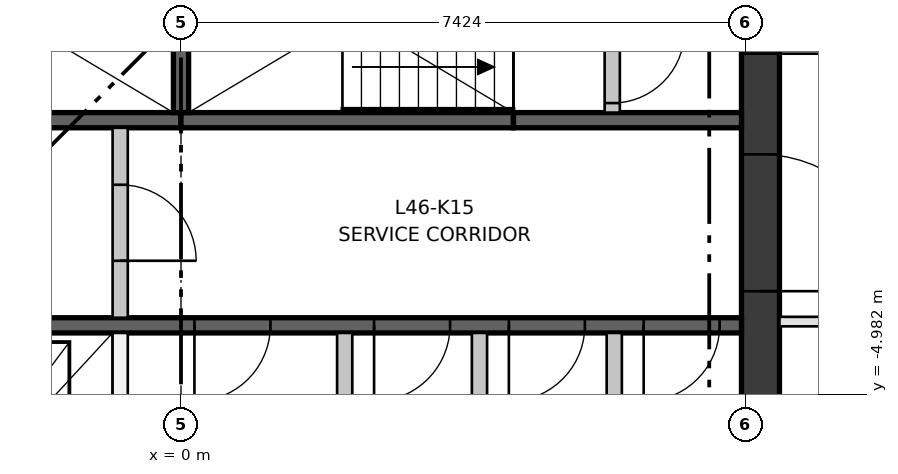
"""IFC4 building model, lengths in metres.
Left out: names, types, materials, properties, quantities, classifications, styles, units other than length and angle.
Written with IfcOpenShell. Run it as: python <this file> out.ifc"""

import sys

from ifc_helpers import new_model, si_unit, direction, frame, frame_2d, origin, place, context, subcontext, project, spatial, rectangle, extrude, element, fill, save


model = new_model("IFC4")
c1 = context("Model", 3, precision=1e-05, world=origin(), true_north=direction((0.0, 1.0)))
c2 = subcontext(c1, "Body", "Model", "MODEL_VIEW")
j1 = project(units=[si_unit("LENGTHUNIT", "METRE"), si_unit("PLANEANGLEUNIT", "RADIAN")], contexts=[c1])
p1 = place(None, origin())
s1 = spatial("IfcSite", under=j1, at=p1, CompositionType="ELEMENT")
p2 = place(p1, origin())
s2 = spatial("IfcBuilding", under=s1, at=p2, CompositionType="ELEMENT")
p3 = place(p2, frame((0.0, 0.0, 174.25)))
s3 = spatial("IfcBuildingStorey", under=s2, at=p3, CompositionType="ELEMENT", Elevation=174.25)
p4 = place(p3, frame((7.624, -7.374, 0.0), z_axis=(0.0, 0.0, 1.0), x_axis=(0.0, 1.0, 0.0)))
e1 = element("IfcWall", 1, at=p4, inside=s3, PredefinedType="SHEAR", context=c2, shape_type="SweptSolid", body=[
    extrude(rectangle(XDim=14.748, YDim=0.5, at=frame_2d((7.374, 0.0))), origin(), (0.0, 0.0, 1.0), 3.35),
])
p5 = place(p4, frame((6.874, 0.0, 0.0)))
e2 = element("IfcOpeningElement", 2, at=p5, cuts=e1, PredefinedType="OPENING", context=c2, shape_type="SweptSolid", body=[
    extrude(rectangle(XDim=1.0, YDim=2.1, at=frame_2d((0.5, 1.05))), frame((0.0, 0.26, 0.0), z_axis=(0.0, -1.0, 0.0), x_axis=(1.0, 0.0, 0.0)), (0.0, 0.0, 1.0), 0.52),
])
p6 = place(p4, frame((3.75, 0.0, 0.0)))
e3 = element("IfcOpeningElement", 3, at=p6, cuts=e1, PredefinedType="OPENING", context=c2, shape_type="SweptSolid", body=[
    extrude(rectangle(XDim=1.8, YDim=2.1, at=frame_2d((0.9, 1.05))), frame((0.0, 0.26, 0.0), z_axis=(0.0, -1.0, 0.0), x_axis=(1.0, 0.0, 0.0)), (0.0, 0.0, 1.0), 0.52),
])
p7 = place(p4, frame((9.198, 0.0, 0.0)))
e4 = element("IfcOpeningElement", 4, at=p7, cuts=e1, PredefinedType="OPENING", context=c2, shape_type="SweptSolid", body=[
    extrude(rectangle(XDim=1.8, YDim=2.1, at=frame_2d((0.9, 1.05))), frame((0.0, 0.26, 0.0), z_axis=(0.0, -1.0, 0.0), x_axis=(1.0, 0.0, 0.0)), (0.0, 0.0, 1.0), 0.52),
])
p8 = place(p3, frame((-7.374, -4.074, 0.0), z_axis=(0.0, 0.0, 1.0), x_axis=(1.0, 0.0, 0.0)))
e5 = element("IfcWall", 5, at=p8, inside=s3, PredefinedType="SHEAR", context=c2, shape_type="SweptSolid", body=[
    extrude(rectangle(XDim=14.748, YDim=0.2, at=frame_2d((7.374, 0.0))), origin(), (0.0, 0.0, 1.0), 3.0),
])
p9 = place(p8, frame((1.319, 0.0, 0.0)))
e6 = element("IfcOpeningElement", 6, at=p9, cuts=e5, PredefinedType="OPENING", context=c2, shape_type="SweptSolid", body=[
    extrude(rectangle(XDim=1.1, YDim=2.1, at=frame_2d((0.55, 1.05))), frame((0.0, 0.11, 0.0), z_axis=(0.0, -1.0, 0.0), x_axis=(1.0, 0.0, 0.0)), (0.0, 0.0, 1.0), 0.22),
])
p10 = place(p8, frame((4.456, 0.0, 0.0)))
e7 = element("IfcOpeningElement", 7, at=p10, cuts=e5, PredefinedType="OPENING", context=c2, shape_type="SweptSolid", body=[
    extrude(rectangle(XDim=1.1, YDim=2.1, at=frame_2d((0.55, 1.05))), frame((0.0, 0.11, 0.0), z_axis=(0.0, -1.0, 0.0), x_axis=(1.0, 0.0, 0.0)), (0.0, 0.0, 1.0), 0.22),
])
p11 = place(p8, frame((7.551, 0.0, 0.0)))
e8 = element("IfcOpeningElement", 8, at=p11, cuts=e5, PredefinedType="OPENING", context=c2, shape_type="SweptSolid", body=[
    extrude(rectangle(XDim=1.0, YDim=2.1, at=frame_2d((0.5, 1.05))), frame((0.0, 0.11, 0.0), z_axis=(0.0, -1.0, 0.0), x_axis=(1.0, 0.0, 0.0)), (0.0, 0.0, 1.0), 0.22),
])
p12 = place(p8, frame((9.914, 0.0, 0.0)))
e9 = element("IfcOpeningElement", 9, at=p12, cuts=e5, PredefinedType="OPENING", context=c2, shape_type="SweptSolid", body=[
    extrude(rectangle(XDim=1.0, YDim=2.1, at=frame_2d((0.5, 1.05))), frame((0.0, 0.11, 0.0), z_axis=(0.0, -1.0, 0.0), x_axis=(1.0, 0.0, 0.0)), (0.0, 0.0, 1.0), 0.22),
])
p13 = place(p8, frame((11.688, 0.0, 0.0)))
e10 = element("IfcOpeningElement", 10, at=p13, cuts=e5, PredefinedType="OPENING", context=c2, shape_type="SweptSolid", body=[
    extrude(rectangle(XDim=1.0, YDim=2.1, at=frame_2d((0.5, 1.05))), frame((0.0, 0.11, 0.0), z_axis=(0.0, -1.0, 0.0), x_axis=(1.0, 0.0, 0.0)), (0.0, 0.0, 1.0), 0.22),
])
p14 = place(p8, frame((13.461, 0.0, 0.0)))
e11 = element("IfcOpeningElement", 11, at=p14, cuts=e5, PredefinedType="OPENING", context=c2, shape_type="SweptSolid", body=[
    extrude(rectangle(XDim=1.0, YDim=2.1, at=frame_2d((0.5, 1.05))), frame((0.0, 0.11, 0.0), z_axis=(0.0, -1.0, 0.0), x_axis=(1.0, 0.0, 0.0)), (0.0, 0.0, 1.0), 0.22),
])
for number, where, z_axis, x_axis in (
    (12, (-4.374, -1.375, 0.0), (0.0, 0.0, 1.0), (1.0, 0.0, 0.0)),
    (13, (0.0, -1.375, 0.0), (0.0, 0.0, 1.0), (1.0, 0.0, 0.0)),
):
    element("IfcWall", number, at=place(p3, frame(where, z_axis=z_axis, x_axis=x_axis)), inside=s3, PredefinedType="SHEAR", context=c2, shape_type="SweptSolid", body=[
        extrude(rectangle(XDim=4.374, YDim=0.2, at=frame_2d((2.187, 0.0))), origin(), (0.0, 0.0, 1.0), 3.0),
    ])
p15 = place(p3, frame((4.374, -1.375, 0.0), z_axis=(0.0, 0.0, 1.0), x_axis=(1.0, 0.0, 0.0)))
e14 = element("IfcWall", 14, at=p15, inside=s3, PredefinedType="SHEAR", context=c2, shape_type="SweptSolid", body=[
    extrude(rectangle(XDim=3.0, YDim=0.2, at=frame_2d((1.5, 0.0))), origin(), (0.0, 0.0, 1.0), 3.0),
])
p16 = place(p3, frame((0.0, -1.275, 0.0), z_axis=(0.0, 0.0, 1.0), x_axis=(0.0, 1.0, 0.0)))
e15 = element("IfcWall", 15, at=p16, inside=s3, PredefinedType="SHEAR", context=c2, shape_type="SweptSolid", body=[
    extrude(rectangle(XDim=2.55, YDim=0.2, at=frame_2d((1.275, 0.0))), origin(), (0.0, 0.0, 1.0), 3.0),
])
p17 = place(p3, frame((-0.8, -7.374, 0.0), z_axis=(0.0, 0.0, 1.0), x_axis=(0.0, 1.0, 0.0)))
e16 = element("IfcWall", 16, at=p17, inside=s3, PredefinedType="PARTITIONING", context=c2, shape_type="SweptSolid", body=[
    extrude(rectangle(XDim=3.2, YDim=0.2, at=frame_2d((1.6, 0.0))), origin(), (0.0, 0.0, 1.0), 3.0),
])
p18 = place(p3, frame((-0.8, -3.974, 0.0), z_axis=(0.0, 0.0, 1.0), x_axis=(0.0, 1.0, 0.0)))
e17 = element("IfcWall", 17, at=p18, inside=s3, PredefinedType="PARTITIONING", context=c2, shape_type="SweptSolid", body=[
    extrude(rectangle(XDim=2.499, YDim=0.2, at=frame_2d((1.25, 0.0))), origin(), (0.0, 0.0, 1.0), 3.0),
])
p19 = place(p18, frame((0.75, 0.0, 0.0)))
e18 = element("IfcOpeningElement", 18, at=p19, cuts=e17, PredefinedType="OPENING", context=c2, shape_type="SweptSolid", body=[
    extrude(rectangle(XDim=1.0, YDim=2.1, at=frame_2d((0.5, 1.05))), frame((0.0, 0.11, 0.0), z_axis=(0.0, -1.0, 0.0), x_axis=(1.0, 0.0, 0.0)), (0.0, 0.0, 1.0), 0.22),
])
for number, where, z_axis, x_axis in (
    (19, (2.154, -7.374, 0.0), (0.0, 0.0, 1.0), (0.0, 1.0, 0.0)),
    (20, (3.927, -7.374, 0.0), (0.0, 0.0, 1.0), (0.0, 1.0, 0.0)),
    (21, (5.7, -7.374, 0.0), (0.0, 0.0, 1.0), (0.0, 1.0, 0.0)),
):
    element("IfcWall", number, at=place(p3, frame(where, z_axis=z_axis, x_axis=x_axis)), inside=s3, PredefinedType="PARTITIONING", context=c2, shape_type="SweptSolid", body=[
        extrude(rectangle(XDim=3.2, YDim=0.2, at=frame_2d((1.6, 0.0))), origin(), (0.0, 0.0, 1.0), 3.0),
    ])
p20 = place(p3, frame((5.674, -1.275, 0.0), z_axis=(0.0, 0.0, 1.0), x_axis=(0.0, 1.0, 0.0)))
e22 = element("IfcWall", 22, at=p20, inside=s3, PredefinedType="PARTITIONING", context=c2, shape_type="SweptSolid", body=[
    extrude(rectangle(XDim=2.55, YDim=0.2, at=frame_2d((1.275, 0.0))), origin(), (0.0, 0.0, 1.0), 3.0),
])
p21 = place(p20, frame((0.125, 0.0, 0.0)))
e23 = element("IfcOpeningElement", 23, at=p21, cuts=e22, PredefinedType="OPENING", context=c2, shape_type="SweptSolid", body=[
    extrude(rectangle(XDim=0.95, YDim=2.1, at=frame_2d((0.475, 1.05))), frame((0.0, 0.11, 0.0), z_axis=(0.0, -1.0, 0.0), x_axis=(1.0, 0.0, 0.0)), (0.0, 0.0, 1.0), 0.22),
])
p22 = place(p20, frame((1.475, 0.0, 0.0)))
e24 = element("IfcOpeningElement", 24, at=p22, cuts=e22, PredefinedType="OPENING", context=c2, shape_type="SweptSolid", body=[
    extrude(rectangle(XDim=0.95, YDim=2.1, at=frame_2d((0.475, 1.05))), frame((0.0, 0.11, 0.0), z_axis=(0.0, -1.0, 0.0), x_axis=(1.0, 0.0, 0.0)), (0.0, 0.0, 1.0), 0.22),
])
p23 = place(p3, frame((12.615, -4.024, 0.0), z_axis=(0.0, 0.0, 1.0), x_axis=(-1.0, 0.0, 0.0)))
e25 = element("IfcWall", 25, at=p23, inside=s3, PredefinedType="PARTITIONING", context=c2, shape_type="SweptSolid", body=[
    extrude(rectangle(XDim=4.741, YDim=0.125, at=frame_2d((2.37, 0.0))), origin(), (0.0, 0.0, 1.0), 3.0),
])
p24 = place(p23, frame((1.9, 0.0, 0.0)))
e26 = element("IfcOpeningElement", 26, at=p24, cuts=e25, PredefinedType="OPENING", context=c2, shape_type="SweptSolid", body=[
    extrude(rectangle(XDim=1.0, YDim=2.1, at=frame_2d((0.5, 1.05))), frame((0.0, 0.073, 0.0), z_axis=(0.0, -1.0, 0.0), x_axis=(1.0, 0.0, 0.0)), (0.0, 0.0, 1.0), 0.145),
])
p25 = place(p21, frame((0.95, 0.0, 0.0), z_axis=(0.0, 0.0, 1.0), x_axis=(-1.0, 0.0, 0.0)))
e27 = element("IfcDoor", 27, at=p25, inside=s3, OperationType="SINGLE_SWING_RIGHT", PredefinedType="DOOR", context=c2, shape_type="SweptSolid", body=[
    extrude(rectangle(XDim=0.95, YDim=2.1, at=frame_2d((0.475, 1.05))), frame((0.0, 0.025, 0.0), z_axis=(0.0, -1.0, 0.0), x_axis=(1.0, 0.0, 0.0)), (0.0, 0.0, 1.0), 0.05),
])
fill(e23, e27)
p26 = place(p19, frame((1.0, 0.0, 0.0), z_axis=(0.0, 0.0, 1.0), x_axis=(-1.0, 0.0, 0.0)))
e28 = element("IfcDoor", 28, at=p26, inside=s3, OperationType="SINGLE_SWING_LEFT", PredefinedType="DOOR", context=c2, shape_type="SweptSolid", body=[
    extrude(rectangle(XDim=1.0, YDim=2.1, at=frame_2d((0.5, 1.05))), frame((0.0, 0.025, 0.0), z_axis=(0.0, -1.0, 0.0), x_axis=(1.0, 0.0, 0.0)), (0.0, 0.0, 1.0), 0.05),
])
fill(e18, e28)
p27 = place(p11, frame((1.0, 0.0, 0.0), z_axis=(0.0, 0.0, 1.0), x_axis=(-1.0, 0.0, 0.0)))
e29 = element("IfcDoor", 29, at=p27, inside=s3, OperationType="SINGLE_SWING_LEFT", PredefinedType="DOOR", context=c2, shape_type="SweptSolid", body=[
    extrude(rectangle(XDim=1.0, YDim=2.1, at=frame_2d((0.5, 1.05))), frame((0.0, 0.025, 0.0), z_axis=(0.0, -1.0, 0.0), x_axis=(1.0, 0.0, 0.0)), (0.0, 0.0, 1.0), 0.05),
])
fill(e8, e29)
p28 = place(p12, frame((1.0, 0.0, 0.0), z_axis=(0.0, 0.0, 1.0), x_axis=(-1.0, 0.0, 0.0)))
e30 = element("IfcDoor", 30, at=p28, inside=s3, OperationType="SINGLE_SWING_LEFT", PredefinedType="DOOR", context=c2, shape_type="SweptSolid", body=[
    extrude(rectangle(XDim=1.0, YDim=2.1, at=frame_2d((0.5, 1.05))), frame((0.0, 0.025, 0.0), z_axis=(0.0, -1.0, 0.0), x_axis=(1.0, 0.0, 0.0)), (0.0, 0.0, 1.0), 0.05),
])
fill(e9, e30)
p29 = place(p13, frame((1.0, 0.0, 0.0), z_axis=(0.0, 0.0, 1.0), x_axis=(-1.0, 0.0, 0.0)))
e31 = element("IfcDoor", 31, at=p29, inside=s3, OperationType="SINGLE_SWING_LEFT", PredefinedType="DOOR", context=c2, shape_type="SweptSolid", body=[
    extrude(rectangle(XDim=1.0, YDim=2.1, at=frame_2d((0.5, 1.05))), frame((0.0, 0.025, 0.0), z_axis=(0.0, -1.0, 0.0), x_axis=(1.0, 0.0, 0.0)), (0.0, 0.0, 1.0), 0.05),
])
fill(e10, e31)
p30 = place(p14, frame((1.0, 0.0, 0.0), z_axis=(0.0, 0.0, 1.0), x_axis=(-1.0, 0.0, 0.0)))
e32 = element("IfcDoor", 32, at=p30, inside=s3, OperationType="SINGLE_SWING_LEFT", PredefinedType="DOOR", context=c2, shape_type="SweptSolid", body=[
    extrude(rectangle(XDim=1.0, YDim=2.1, at=frame_2d((0.5, 1.05))), frame((0.0, 0.025, 0.0), z_axis=(0.0, -1.0, 0.0), x_axis=(1.0, 0.0, 0.0)), (0.0, 0.0, 1.0), 0.05),
])
fill(e11, e32)
p31 = place(p5, frame((1.0, 0.0, 0.0), z_axis=(0.0, 0.0, 1.0), x_axis=(-1.0, 0.0, 0.0)))
e33 = element("IfcDoor", 33, at=p31, inside=s3, OperationType="SINGLE_SWING_LEFT", PredefinedType="DOOR", context=c2, shape_type="SweptSolid", body=[
    extrude(rectangle(XDim=1.0, YDim=2.1, at=frame_2d((0.5, 1.05))), frame((0.0, 0.25, 0.0), z_axis=(0.0, -1.0, 0.0), x_axis=(1.0, 0.0, 0.0)), (0.0, 0.0, 1.0), 0.05),
])
fill(e2, e33)
p32 = place(p6, frame((1.8, 0.0, 0.0), z_axis=(0.0, 0.0, 1.0), x_axis=(-1.0, 0.0, 0.0)))
e34 = element("IfcDoor", 34, at=p32, inside=s3, OperationType="DOUBLE_DOOR_SINGLE_SWING", PredefinedType="DOOR", context=c2, shape_type="SweptSolid", body=[
    extrude(rectangle(XDim=1.8, YDim=2.1, at=frame_2d((0.9, 1.05))), frame((0.0, 0.025, 0.0), z_axis=(0.0, -1.0, 0.0), x_axis=(1.0, 0.0, 0.0)), (0.0, 0.0, 1.0), 0.05),
])
fill(e3, e34)
save(model, sys.argv[1])
